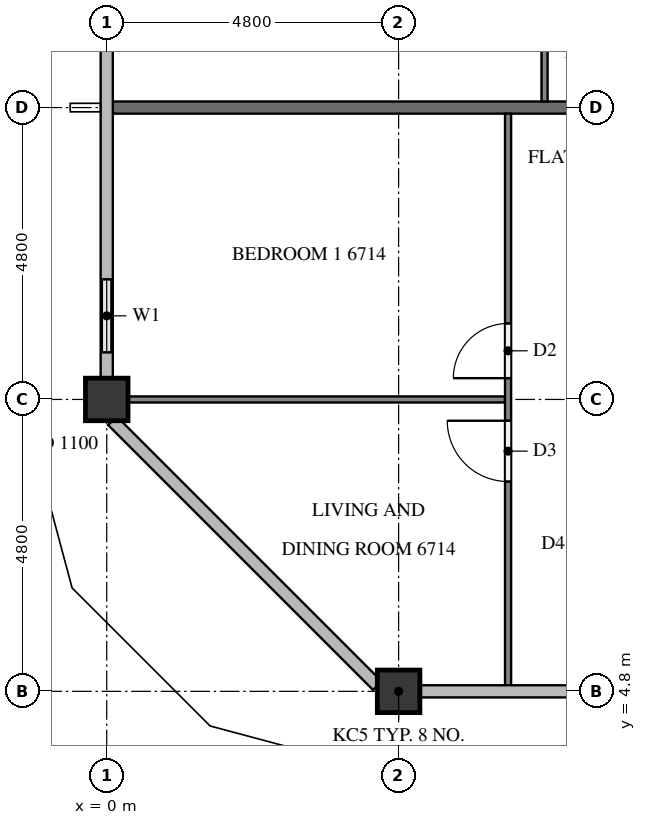
"""IFC4 building model, lengths in metres.
Left out: names, types, materials, properties, quantities, classifications, styles, units other than length and angle.
Written with IfcOpenShell. Run it as: python <this file> out.ifc"""

import sys

from ifc_helpers import new_model, si_unit, direction, frame, frame_2d, origin, origin_2d, place, context, subcontext, project, spatial, rectangle, extrude, element, fill, save


model = new_model("IFC4")
c1 = context("Model", 3, precision=1e-05, world=origin(), true_north=direction((0.0, 1.0)))
c2 = subcontext(c1, "Body", "Model", "MODEL_VIEW")
j1 = project(units=[si_unit("LENGTHUNIT", "METRE"), si_unit("PLANEANGLEUNIT", "RADIAN")], contexts=[c1])
p1 = place(None, origin())
s1 = spatial("IfcSite", under=j1, at=p1, CompositionType="ELEMENT")
p2 = place(p1, origin())
s2 = spatial("IfcBuilding", under=s1, at=p2, CompositionType="ELEMENT")
p3 = place(p2, frame((0.0, 0.0, 256.2)))
s3 = spatial("IfcBuildingStorey", under=s2, at=p3, CompositionType="ELEMENT", Elevation=256.2)
for number, where, z_axis, x_axis in (
    (1, (4.8, 4.8, 0.0), (0.0, 0.0, 1.0), (1.0, 0.0, 0.0)),
    (2, (0.0, 9.6, 0.0), (0.0, 0.0, 1.0), (1.0, 0.0, 0.0)),
):
    element("IfcColumn", number, at=place(p3, frame(where, z_axis=z_axis, x_axis=x_axis)), inside=s3, PredefinedType="COLUMN", context=c2, shape_type="SweptSolid", body=[
        extrude(rectangle(XDim=0.7, YDim=0.7, at=origin_2d()), origin(), (0.0, 0.0, 1.0), 3.2),
    ])
p4 = place(p3, frame((0.0, 12.0, 0.0), z_axis=(0.0, 0.0, 1.0), x_axis=(0.0, -1.0, 0.0)))
e3 = element("IfcWall", 3, at=p4, inside=s3, PredefinedType="SOLIDWALL", context=c2, shape_type="SweptSolid", body=[
    extrude(rectangle(XDim=2.05, YDim=0.15, at=frame_2d((1.025, 0.0))), origin(), (0.0, 0.0, 1.0), 3.2),
])
p5 = place(p4, frame((0.425, 0.0, 0.9)))
e4 = element("IfcOpeningElement", 4, at=p5, cuts=e3, PredefinedType="OPENING", context=c2, shape_type="SweptSolid", body=[
    extrude(rectangle(XDim=1.2, YDim=1.4, at=frame_2d((0.6, 0.7))), frame((0.0, 0.085, 0.0), z_axis=(0.0, -1.0, 0.0), x_axis=(1.0, 0.0, 0.0)), (0.0, 0.0, 1.0), 0.17),
])
p6 = place(p3, frame((0.1, 14.4, 0.0), z_axis=(0.0, 0.0, 1.0), x_axis=(1.0, 0.0, 0.0)))
e5 = element("IfcWall", 5, at=p6, inside=s3, PredefinedType="PARTITIONING", context=c2, shape_type="SweptSolid", body=[
    extrude(rectangle(XDim=11.8, YDim=0.2, at=frame_2d((5.9, 0.0))), origin(), (0.0, 0.0, 1.0), 3.2),
])
p7 = place(p3, frame((7.2, 14.5, 0.0), z_axis=(0.0, 0.0, 1.0), x_axis=(0.0, 1.0, 0.0)))
e6 = element("IfcWall", 6, at=p7, inside=s3, PredefinedType="PARTITIONING", context=c2, shape_type="SweptSolid", body=[
    extrude(rectangle(XDim=9.4, YDim=0.1, at=frame_2d((4.7, 0.0))), origin(), (0.0, 0.0, 1.0), 3.2),
])
p8 = place(p7, frame((3.45, 0.0, 0.0)))
e7 = element("IfcOpeningElement", 7, at=p8, cuts=e6, PredefinedType="OPENING", context=c2, shape_type="SweptSolid", body=[
    extrude(rectangle(XDim=0.9, YDim=2.1, at=frame_2d((0.45, 1.05))), frame((0.0, 0.06, 0.0), z_axis=(0.0, -1.0, 0.0), x_axis=(1.0, 0.0, 0.0)), (0.0, 0.0, 1.0), 0.12),
])
p9 = place(p7, frame((5.05, 0.0, 0.0)))
e8 = element("IfcOpeningElement", 8, at=p9, cuts=e6, PredefinedType="OPENING", context=c2, shape_type="SweptSolid", body=[
    extrude(rectangle(XDim=1.0, YDim=2.1, at=frame_2d((0.5, 1.05))), frame((0.0, 0.06, 0.0), z_axis=(0.0, -1.0, 0.0), x_axis=(1.0, 0.0, 0.0)), (0.0, 0.0, 1.0), 0.12),
])
p10 = place(p3, frame((6.55, 9.6, 0.0), z_axis=(0.0, 0.0, 1.0), x_axis=(-1.0, 0.0, 0.0)))
e9 = element("IfcWall", 9, at=p10, inside=s3, PredefinedType="PARTITIONING", context=c2, shape_type="SweptSolid", body=[
    extrude(rectangle(XDim=6.2, YDim=0.1, at=frame_2d((3.1, 0.0))), origin(), (0.0, 0.0, 1.0), 3.2),
])
p11 = place(p3, frame((6.6, 4.9, 0.0), z_axis=(0.0, 0.0, 1.0), x_axis=(0.0, 1.0, 0.0)))
e10 = element("IfcWall", 10, at=p11, inside=s3, PredefinedType="PARTITIONING", context=c2, shape_type="SweptSolid", body=[
    extrude(rectangle(XDim=9.4, YDim=0.1, at=frame_2d((4.7, 0.0))), origin(), (0.0, 0.0, 1.0), 3.2),
])
p12 = place(p11, frame((5.05, 0.0, 0.0)))
e11 = element("IfcOpeningElement", 11, at=p12, cuts=e10, PredefinedType="OPENING", context=c2, shape_type="SweptSolid", body=[
    extrude(rectangle(XDim=0.9, YDim=2.1, at=frame_2d((0.45, 1.05))), frame((0.0, 0.06, 0.0), z_axis=(0.0, -1.0, 0.0), x_axis=(1.0, 0.0, 0.0)), (0.0, 0.0, 1.0), 0.12),
])
p13 = place(p11, frame((3.35, 0.0, 0.0)))
e12 = element("IfcOpeningElement", 12, at=p13, cuts=e10, PredefinedType="OPENING", context=c2, shape_type="SweptSolid", body=[
    extrude(rectangle(XDim=1.0, YDim=2.1, at=frame_2d((0.5, 1.05))), frame((0.0, 0.06, 0.0), z_axis=(0.0, -1.0, 0.0), x_axis=(1.0, 0.0, 0.0)), (0.0, 0.0, 1.0), 0.12),
])
p14 = place(p5, origin())
e13 = element("IfcWindow", 13, at=p14, inside=s3, PartitioningType="SINGLE_PANEL", PredefinedType="WINDOW", context=c2, shape_type="SweptSolid", body=[
    extrude(rectangle(XDim=1.2, YDim=1.4, at=frame_2d((0.6, 0.7))), frame((0.0, 0.03, 0.0), z_axis=(0.0, -1.0, 0.0), x_axis=(1.0, 0.0, 0.0)), (0.0, 0.0, 1.0), 0.06),
])
fill(e4, e13)
p15 = place(p12, origin())
e14 = element("IfcDoor", 14, at=p15, inside=s3, OperationType="SINGLE_SWING_LEFT", PredefinedType="DOOR", context=c2, shape_type="SweptSolid", body=[
    extrude(rectangle(XDim=0.9, YDim=2.1, at=frame_2d((0.45, 1.05))), frame((0.0, 0.025, 0.0), z_axis=(0.0, -1.0, 0.0), x_axis=(1.0, 0.0, 0.0)), (0.0, 0.0, 1.0), 0.05),
])
fill(e11, e14)
p16 = place(p13, origin())
e15 = element("IfcDoor", 15, at=p16, inside=s3, OperationType="SINGLE_SWING_RIGHT", PredefinedType="DOOR", context=c2, shape_type="SweptSolid", body=[
    extrude(rectangle(XDim=1.0, YDim=2.1, at=frame_2d((0.5, 1.05))), frame((0.0, 0.025, 0.0), z_axis=(0.0, -1.0, 0.0), x_axis=(1.0, 0.0, 0.0)), (0.0, 0.0, 1.0), 0.05),
])
fill(e12, e15)
save(model, sys.argv[1])
